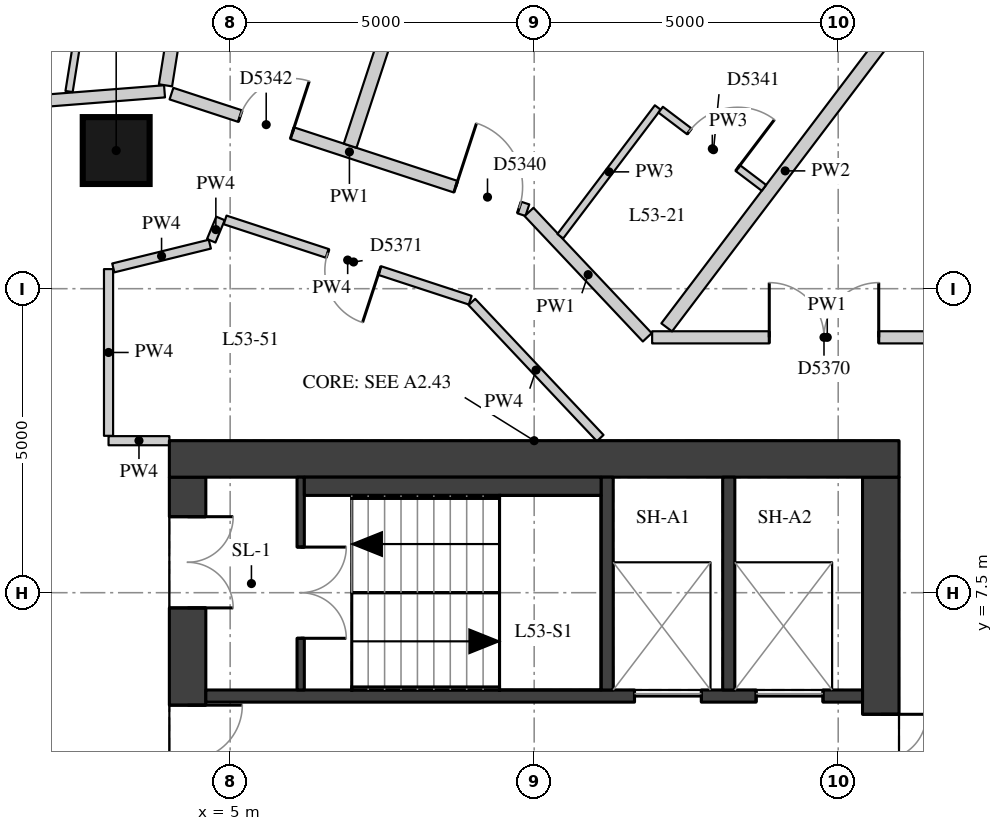
"""IFC4 building model, lengths in metres.
Left out: names, types, materials, properties, quantities, classifications, styles, units other than length and angle.
Written with IfcOpenShell. Run it as: python <this file> out.ifc"""

import sys

from ifc_helpers import new_model, si_unit, direction, frame, frame_2d, origin, origin_2d, place, context, subcontext, project, spatial, rectangle, extrude, element, fill, save


model = new_model("IFC4")
c1 = context("Model", 3, precision=1e-05, world=origin(), true_north=direction((0.0, 1.0)))
c2 = subcontext(c1, "Body", "Model", "MODEL_VIEW")
j1 = project(units=[si_unit("LENGTHUNIT", "METRE"), si_unit("PLANEANGLEUNIT", "RADIAN")], contexts=[c1])
p1 = place(None, origin())
s1 = spatial("IfcSite", under=j1, at=p1, CompositionType="ELEMENT")
p2 = place(p1, origin())
s2 = spatial("IfcBuilding", under=s1, at=p2, CompositionType="ELEMENT")
p3 = place(p2, frame((0.0, 0.0, 189.2)))
s3 = spatial("IfcBuildingStorey", under=s2, at=p3, CompositionType="ELEMENT", Elevation=189.2)
p4 = place(p3, frame((3.126, 14.772, 0.0), z_axis=(0.0, 0.0, 1.0), x_axis=(1.0, 0.0, 0.0)))
e1 = element("IfcColumn", 1, at=p4, inside=s3, PredefinedType="COLUMN", context=c2, shape_type="SweptSolid", body=[
    extrude(rectangle(XDim=1.1, YDim=1.1, at=origin_2d()), origin(), (0.0, 0.0, 1.0), 3.3),
])
p5 = place(p3, frame((4.3, -9.4, 0.0), z_axis=(0.0, 0.0, 1.0), x_axis=(0.0, 1.0, 0.0)))
e2 = element("IfcWall", 2, at=p5, inside=s3, PredefinedType="SHEAR", context=c2, shape_type="SweptSolid", body=[
    extrude(rectangle(XDim=18.8, YDim=0.6, at=frame_2d((9.4, 0.0))), origin(), (0.0, 0.0, 1.0), 3.02),
])
p6 = place(p5, frame((0.65, 0.0, 0.0)))
e3 = element("IfcOpeningElement", 3, at=p6, cuts=e2, PredefinedType="OPENING", context=c2, shape_type="SweptSolid", body=[
    extrude(rectangle(XDim=1.5, YDim=2.1, at=frame_2d((0.75, 1.05))), frame((0.0, 0.31, 0.0), z_axis=(0.0, -1.0, 0.0), x_axis=(1.0, 0.0, 0.0)), (0.0, 0.0, 1.0), 0.62),
])
p7 = place(p5, frame((3.75, 0.0, 0.0)))
e4 = element("IfcOpeningElement", 4, at=p7, cuts=e2, PredefinedType="OPENING", context=c2, shape_type="SweptSolid", body=[
    extrude(rectangle(XDim=1.8, YDim=2.1, at=frame_2d((0.9, 1.05))), frame((0.0, 0.31, 0.0), z_axis=(0.0, -1.0, 0.0), x_axis=(1.0, 0.0, 0.0)), (0.0, 0.0, 1.0), 0.62),
])
p8 = place(p5, frame((6.25, 0.0, 0.0)))
e5 = element("IfcOpeningElement", 5, at=p8, cuts=e2, PredefinedType="OPENING", context=c2, shape_type="SweptSolid", body=[
    extrude(rectangle(XDim=1.1, YDim=2.1, at=frame_2d((0.55, 1.05))), frame((0.0, 0.31, 0.0), z_axis=(0.0, -1.0, 0.0), x_axis=(1.0, 0.0, 0.0)), (0.0, 0.0, 1.0), 0.62),
])
p9 = place(p5, frame((8.9, 0.0, 0.0)))
e6 = element("IfcOpeningElement", 6, at=p9, cuts=e2, PredefinedType="OPENING", context=c2, shape_type="SweptSolid", body=[
    extrude(rectangle(XDim=1.0, YDim=2.1, at=frame_2d((0.5, 1.05))), frame((0.0, 0.31, 0.0), z_axis=(0.0, -1.0, 0.0), x_axis=(1.0, 0.0, 0.0)), (0.0, 0.0, 1.0), 0.62),
])
p10 = place(p5, frame((11.45, 0.0, 0.0)))
e7 = element("IfcOpeningElement", 7, at=p10, cuts=e2, PredefinedType="OPENING", context=c2, shape_type="SweptSolid", body=[
    extrude(rectangle(XDim=1.1, YDim=2.1, at=frame_2d((0.55, 1.05))), frame((0.0, 0.31, 0.0), z_axis=(0.0, -1.0, 0.0), x_axis=(1.0, 0.0, 0.0)), (0.0, 0.0, 1.0), 0.62),
])
p11 = place(p5, frame((13.25, 0.0, 0.0)))
e8 = element("IfcOpeningElement", 8, at=p11, cuts=e2, PredefinedType="OPENING", context=c2, shape_type="SweptSolid", body=[
    extrude(rectangle(XDim=1.8, YDim=2.1, at=frame_2d((0.9, 1.05))), frame((0.0, 0.31, 0.0), z_axis=(0.0, -1.0, 0.0), x_axis=(1.0, 0.0, 0.0)), (0.0, 0.0, 1.0), 0.62),
])
p12 = place(p5, frame((16.65, 0.0, 0.0)))
e9 = element("IfcOpeningElement", 9, at=p12, cuts=e2, PredefinedType="OPENING", context=c2, shape_type="SweptSolid", body=[
    extrude(rectangle(XDim=1.5, YDim=2.1, at=frame_2d((0.75, 1.05))), frame((0.0, 0.31, 0.0), z_axis=(0.0, -1.0, 0.0), x_axis=(1.0, 0.0, 0.0)), (0.0, 0.0, 1.0), 0.62),
])
p13 = place(p3, frame((15.7, -9.4, 0.0), z_axis=(0.0, 0.0, 1.0), x_axis=(0.0, 1.0, 0.0)))
e10 = element("IfcWall", 10, at=p13, inside=s3, PredefinedType="SHEAR", context=c2, shape_type="SweptSolid", body=[
    extrude(rectangle(XDim=18.8, YDim=0.6, at=frame_2d((9.4, 0.0))), origin(), (0.0, 0.0, 1.0), 3.02),
])
p14 = place(p13, frame((13.4, 0.0, 0.0)))
e11 = element("IfcOpeningElement", 11, at=p14, cuts=e10, PredefinedType="OPENING", context=c2, shape_type="SweptSolid", body=[
    extrude(rectangle(XDim=1.5, YDim=2.1, at=frame_2d((0.75, 1.05))), frame((0.0, 0.31, 0.0), z_axis=(0.0, -1.0, 0.0), x_axis=(1.0, 0.0, 0.0)), (0.0, 0.0, 1.0), 0.62),
])
p15 = place(p13, frame((3.9, 0.0, 0.0)))
e12 = element("IfcOpeningElement", 12, at=p15, cuts=e10, PredefinedType="OPENING", context=c2, shape_type="SweptSolid", body=[
    extrude(rectangle(XDim=1.5, YDim=2.1, at=frame_2d((0.75, 1.05))), frame((0.0, 0.31, 0.0), z_axis=(0.0, -1.0, 0.0), x_axis=(1.0, 0.0, 0.0)), (0.0, 0.0, 1.0), 0.62),
])
p16 = place(p3, frame((4.0, 9.7, 0.0), z_axis=(0.0, 0.0, 1.0), x_axis=(1.0, 0.0, 0.0)))
e13 = element("IfcWall", 13, at=p16, inside=s3, PredefinedType="SHEAR", context=c2, shape_type="SweptSolid", body=[
    extrude(rectangle(XDim=12.0, YDim=0.6, at=frame_2d((6.0, 0.0))), origin(), (0.0, 0.0, 1.0), 3.02),
])
p17 = place(p3, frame((4.6, 5.8, 0.0), z_axis=(0.0, 0.0, 1.0), x_axis=(1.0, 0.0, 0.0)))
e14 = element("IfcWall", 14, at=p17, inside=s3, PredefinedType="SHEAR", context=c2, shape_type="SweptSolid", body=[
    extrude(rectangle(XDim=10.8, YDim=0.2, at=frame_2d((5.4, 0.0))), origin(), (0.0, 0.0, 1.0), 3.02),
])
p18 = place(p17, frame((7.05, 0.0, 0.0)))
e15 = element("IfcOpeningElement", 15, at=p18, cuts=e14, PredefinedType="OPENING", context=c2, shape_type="SweptSolid", body=[
    extrude(rectangle(XDim=1.1, YDim=2.1, at=frame_2d((0.55, 1.05))), frame((0.0, 0.11, 0.0), z_axis=(0.0, -1.0, 0.0), x_axis=(1.0, 0.0, 0.0)), (0.0, 0.0, 1.0), 0.22),
])
p19 = place(p17, frame((9.05, 0.0, 0.0)))
e16 = element("IfcOpeningElement", 16, at=p19, cuts=e14, PredefinedType="OPENING", context=c2, shape_type="SweptSolid", body=[
    extrude(rectangle(XDim=1.1, YDim=2.1, at=frame_2d((0.55, 1.05))), frame((0.0, 0.11, 0.0), z_axis=(0.0, -1.0, 0.0), x_axis=(1.0, 0.0, 0.0)), (0.0, 0.0, 1.0), 0.22),
])
for number, where, z_axis, x_axis in (
    (17, (11.2, 5.9, 0.0), (0.0, 0.0, 1.0), (0.0, 1.0, 0.0)),
    (18, (13.2, 5.9, 0.0), (0.0, 0.0, 1.0), (0.0, 1.0, 0.0)),
):
    element("IfcWall", number, at=place(p3, frame(where, z_axis=z_axis, x_axis=x_axis)), inside=s3, PredefinedType="SHEAR", context=c2, shape_type="SweptSolid", body=[
        extrude(rectangle(XDim=3.5, YDim=0.2, at=frame_2d((1.75, 0.0))), origin(), (0.0, 0.0, 1.0), 3.02),
    ])
p20 = place(p3, frame((6.16, 5.9, 0.0), z_axis=(0.0, 0.0, 1.0), x_axis=(0.0, 1.0, 0.0)))
e19 = element("IfcWall", 19, at=p20, inside=s3, PredefinedType="SHEAR", context=c2, shape_type="SweptSolid", body=[
    extrude(rectangle(XDim=3.5, YDim=0.12, at=frame_2d((1.75, 0.0))), origin(), (0.0, 0.0, 1.0), 3.02),
])
p21 = place(p20, frame((0.85, 0.0, 0.0)))
e20 = element("IfcOpeningElement", 20, at=p21, cuts=e19, PredefinedType="OPENING", context=c2, shape_type="SweptSolid", body=[
    extrude(rectangle(XDim=1.5, YDim=2.1, at=frame_2d((0.75, 1.05))), frame((0.0, 0.07, 0.0), z_axis=(0.0, -1.0, 0.0), x_axis=(1.0, 0.0, 0.0)), (0.0, 0.0, 1.0), 0.14),
])
p22 = place(p3, frame((6.22, 9.25, 0.0), z_axis=(0.0, 0.0, 1.0), x_axis=(1.0, 0.0, 0.0)))
e21 = element("IfcWall", 21, at=p22, inside=s3, PredefinedType="PARTITIONING", context=c2, shape_type="SweptSolid", body=[
    extrude(rectangle(XDim=4.88, YDim=0.3, at=frame_2d((2.44, 0.0))), origin(), (0.0, 0.0, 1.0), 3.02),
])
p23 = place(p3, frame((-6.656, 14.915, 0.0), z_axis=(0.0, 0.0, 1.0), x_axis=(0.99693112817, 0.07828362335, 0.0)))
e22 = element("IfcWall", 22, at=p23, inside=s3, PredefinedType="PARTITIONING", context=c2, shape_type="SweptSolid", body=[
    extrude(rectangle(XDim=10.61, YDim=0.2, at=frame_2d((5.305, 0.0))), origin(), (0.0, 0.0, 1.0), 2.42),
])
p24 = place(p23, frame((7.773, 0.0, 0.0)))
e23 = element("IfcOpeningElement", 23, at=p24, cuts=e22, PredefinedType="OPENING", context=c2, shape_type="SweptSolid", body=[
    extrude(rectangle(XDim=0.9, YDim=2.1, at=frame_2d((0.45, 1.05))), frame((0.0, 0.11, 0.0), z_axis=(0.0, -1.0, 0.0), x_axis=(1.0, 0.0, 0.0)), (0.0, 0.0, 1.0), 0.22),
])
p25 = place(p23, frame((4.608, 0.0, 0.0)))
e24 = element("IfcOpeningElement", 24, at=p25, cuts=e22, PredefinedType="OPENING", context=c2, shape_type="SweptSolid", body=[
    extrude(rectangle(XDim=0.9, YDim=2.1, at=frame_2d((0.45, 1.05))), frame((0.0, 0.11, 0.0), z_axis=(0.0, -1.0, 0.0), x_axis=(1.0, 0.0, 0.0)), (0.0, 0.0, 1.0), 0.22),
])
p26 = place(p23, frame((1.632, 0.0, 0.0)))
e25 = element("IfcOpeningElement", 25, at=p26, cuts=e22, PredefinedType="OPENING", context=c2, shape_type="SweptSolid", body=[
    extrude(rectangle(XDim=0.9, YDim=2.1, at=frame_2d((0.45, 1.05))), frame((0.0, 0.11, 0.0), z_axis=(0.0, -1.0, 0.0), x_axis=(1.0, 0.0, 0.0)), (0.0, 0.0, 1.0), 0.22),
])
p27 = place(p3, frame((4.035, 15.708, 0.0), z_axis=(0.0, 0.0, 1.0), x_axis=(0.950331063317, -0.31124085544, 0.0)))
e26 = element("IfcWall", 26, at=p27, inside=s3, PredefinedType="PARTITIONING", context=c2, shape_type="SweptSolid", body=[
    extrude(rectangle(XDim=6.159, YDim=0.2, at=frame_2d((3.08, 0.0))), origin(), (0.0, 0.0, 1.0), 3.02),
])
p28 = place(p27, frame((4.919, 0.0, 0.0)))
e27 = element("IfcOpeningElement", 27, at=p28, cuts=e26, PredefinedType="OPENING", context=c2, shape_type="SweptSolid", body=[
    extrude(rectangle(XDim=1.1, YDim=2.1, at=frame_2d((0.55, 1.05))), frame((0.0, 0.11, 0.0), z_axis=(0.0, -1.0, 0.0), x_axis=(1.0, 0.0, 0.0)), (0.0, 0.0, 1.0), 0.22),
])
p29 = place(p27, frame((1.189, 0.0, 0.0)))
e28 = element("IfcOpeningElement", 28, at=p29, cuts=e26, PredefinedType="OPENING", context=c2, shape_type="SweptSolid", body=[
    extrude(rectangle(XDim=0.9, YDim=2.1, at=frame_2d((0.45, 1.05))), frame((0.0, 0.11, 0.0), z_axis=(0.0, -1.0, 0.0), x_axis=(1.0, 0.0, 0.0)), (0.0, 0.0, 1.0), 0.22),
])
p30 = place(p3, frame((9.916, 13.762, 0.0), z_axis=(0.0, 0.0, 1.0), x_axis=(0.686041532799, -0.727562378958, 0.0)))
e29 = element("IfcWall", 29, at=p30, inside=s3, PredefinedType="PARTITIONING", context=c2, shape_type="SweptSolid", body=[
    extrude(rectangle(XDim=2.834, YDim=0.2, at=frame_2d((1.417, 0.0))), origin(), (0.0, 0.0, 1.0), 3.02),
])
p31 = place(p3, frame((11.94, 11.7, 0.0), z_axis=(0.0, 0.0, 1.0), x_axis=(1.0, 0.0, 0.0)))
e30 = element("IfcWall", 30, at=p31, inside=s3, PredefinedType="PARTITIONING", context=c2, shape_type="SweptSolid", body=[
    extrude(rectangle(XDim=5.76, YDim=0.2, at=frame_2d((2.88, 0.0))), origin(), (0.0, 0.0, 1.0), 3.02),
])
p32 = place(p31, frame((1.927, 0.0, 0.0)))
e31 = element("IfcOpeningElement", 31, at=p32, cuts=e30, PredefinedType="OPENING", context=c2, shape_type="SweptSolid", body=[
    extrude(rectangle(XDim=1.8, YDim=2.1, at=frame_2d((0.9, 1.05))), frame((0.0, 0.11, 0.0), z_axis=(0.0, -1.0, 0.0), x_axis=(1.0, 0.0, 0.0)), (0.0, 0.0, 1.0), 0.22),
])
p33 = place(p3, frame((4.001, 10.0, 0.0), z_axis=(0.0, 0.0, 1.0), x_axis=(-1.0, 0.0, 0.0)))
e32 = element("IfcWall", 32, at=p33, inside=s3, PredefinedType="PARTITIONING", context=c2, shape_type="SweptSolid", body=[
    extrude(rectangle(XDim=1.001, YDim=0.15, at=frame_2d((0.5, 0.0))), origin(), (0.0, 0.0, 1.0), 3.02),
])
p34 = place(p3, frame((3.0, 10.08, 0.0), z_axis=(0.0, 0.0, 1.0), x_axis=(0.0, 1.0, 0.0)))
e33 = element("IfcWall", 33, at=p34, inside=s3, PredefinedType="PARTITIONING", context=c2, shape_type="SweptSolid", body=[
    extrude(rectangle(XDim=2.742, YDim=0.15, at=frame_2d((1.371, 0.0))), origin(), (0.0, 0.0, 1.0), 3.02),
])
p35 = place(p3, frame((3.078, 12.842, 0.0), z_axis=(0.0, 0.0, 1.0), x_axis=(0.9710404657, 0.238915076906, 0.0)))
e34 = element("IfcWall", 34, at=p35, inside=s3, PredefinedType="PARTITIONING", context=c2, shape_type="SweptSolid", body=[
    extrude(rectangle(XDim=1.635, YDim=0.15, at=frame_2d((0.817, 0.0))), origin(), (0.0, 0.0, 1.0), 3.02),
])
p36 = place(p3, frame((4.688, 13.288, 0.0), z_axis=(0.0, 0.0, 1.0), x_axis=(0.38330857492, 0.923620342128, 0.0)))
e35 = element("IfcWall", 35, at=p36, inside=s3, PredefinedType="PARTITIONING", context=c2, shape_type="SweptSolid", body=[
    extrude(rectangle(XDim=0.398, YDim=0.15, at=frame_2d((0.199, 0.0))), origin(), (0.0, 0.0, 1.0), 3.02),
])
p37 = place(p3, frame((4.917, 13.631, 0.0), z_axis=(0.0, 0.0, 1.0), x_axis=(0.950299632499, -0.311336808733, 0.0)))
e36 = element("IfcWall", 36, at=p37, inside=s3, PredefinedType="PARTITIONING", context=c2, shape_type="SweptSolid", body=[
    extrude(rectangle(XDim=4.241, YDim=0.15, at=frame_2d((2.121, 0.0))), origin(), (0.0, 0.0, 1.0), 3.02),
])
p38 = place(p37, frame((1.773, 0.0, 0.0)))
e37 = element("IfcOpeningElement", 37, at=p38, cuts=e36, PredefinedType="OPENING", context=c2, shape_type="SweptSolid", body=[
    extrude(rectangle(XDim=0.9, YDim=2.1, at=frame_2d((0.45, 1.05))), frame((0.0, 0.085, 0.0), z_axis=(0.0, -1.0, 0.0), x_axis=(1.0, 0.0, 0.0)), (0.0, 0.0, 1.0), 0.17),
])
p39 = place(p3, frame((8.975, 12.281, 0.0), z_axis=(0.0, 0.0, 1.0), x_axis=(0.686010468192, -0.727591669503, 0.0)))
e38 = element("IfcWall", 38, at=p39, inside=s3, PredefinedType="PARTITIONING", context=c2, shape_type="SweptSolid", body=[
    extrude(rectangle(XDim=3.077, YDim=0.15, at=frame_2d((1.538, 0.0))), origin(), (0.0, 0.0, 1.0), 3.02),
])
p40 = place(p3, frame((16.077, 17.011, 0.0), z_axis=(0.0, 0.0, 1.0), x_axis=(-0.603635635975, -0.797260320712, 0.0)))
e39 = element("IfcWall", 39, at=p40, inside=s3, PredefinedType="PARTITIONING", context=c2, shape_type="SweptSolid", body=[
    extrude(rectangle(XDim=6.457, YDim=0.22, at=frame_2d((3.229, 0.0))), origin(), (0.0, 0.0, 1.0), 3.02),
])
p41 = place(p3, frame((8.908, 20.743, 0.0), z_axis=(0.0, 0.0, 1.0), x_axis=(-0.311984764468, -0.950087104817, 0.0)))
e40 = element("IfcWall", 40, at=p41, inside=s3, PredefinedType="PARTITIONING", context=c2, shape_type="SweptSolid", body=[
    extrude(rectangle(XDim=6.202, YDim=0.22, at=frame_2d((3.101, 0.0))), origin(), (0.0, 0.0, 1.0), 3.02),
])
p42 = place(p3, frame((4.871, 21.719, 0.0), z_axis=(0.0, 0.0, 1.0), x_axis=(-0.157106861106, -0.987581608878, 0.0)))
e41 = element("IfcWall", 41, at=p42, inside=s3, PredefinedType="PARTITIONING", context=c2, shape_type="SweptSolid", body=[
    extrude(rectangle(XDim=5.949, YDim=0.22, at=frame_2d((2.974, 0.0))), origin(), (0.0, 0.0, 1.0), 2.47),
])
p43 = place(p3, frame((10.43, 13.363, 0.0), z_axis=(0.0, 0.0, 1.0), x_axis=(0.603597479969, 0.797289208616, 0.0)))
e42 = element("IfcWall", 42, at=p43, inside=s3, PredefinedType="PARTITIONING", context=c2, shape_type="SweptSolid", body=[
    extrude(rectangle(XDim=2.656, YDim=0.12, at=frame_2d((1.328, 0.0))), origin(), (0.0, 0.0, 1.0), 3.02),
])
p44 = place(p3, frame((2.351, 15.742, 0.0), z_axis=(0.0, 0.0, 1.0), x_axis=(0.15712488734, 0.987578741052, 0.0)))
e43 = element("IfcWall", 43, at=p44, inside=s3, PredefinedType="PARTITIONING", context=c2, shape_type="SweptSolid", body=[
    extrude(rectangle(XDim=2.75, YDim=0.12, at=frame_2d((1.375, 0.0))), origin(), (0.0, 0.0, 1.0), 2.47),
])
p45 = place(p3, frame((12.081, 15.444, 0.0), z_axis=(0.0, 0.0, 1.0), x_axis=(0.797240905551, -0.603661277967, 0.0)))
e44 = element("IfcWall", 44, at=p45, inside=s3, PredefinedType="PARTITIONING", context=c2, shape_type="SweptSolid", body=[
    extrude(rectangle(XDim=2.13, YDim=0.12, at=frame_2d((1.065, 0.0))), origin(), (0.0, 0.0, 1.0), 3.02),
])
p46 = place(p45, frame((0.59, 0.0, 0.0)))
e45 = element("IfcOpeningElement", 45, at=p46, cuts=e44, PredefinedType="OPENING", context=c2, shape_type="SweptSolid", body=[
    extrude(rectangle(XDim=1.0, YDim=2.1, at=frame_2d((0.5, 1.05))), frame((0.0, 0.07, 0.0), z_axis=(0.0, -1.0, 0.0), x_axis=(1.0, 0.0, 0.0)), (0.0, 0.0, 1.0), 0.14),
])
p47 = place(p11, origin())
e46 = element("IfcDoor", 46, at=p47, inside=s3, OperationType="DOUBLE_DOOR_SINGLE_SWING", PredefinedType="DOOR", context=c2, shape_type="SweptSolid", body=[
    extrude(rectangle(XDim=1.8, YDim=2.1, at=frame_2d((0.9, 1.05))), frame((0.0, 0.025, 0.0), z_axis=(0.0, -1.0, 0.0), x_axis=(1.0, 0.0, 0.0)), (0.0, 0.0, 1.0), 0.05),
])
fill(e8, e46)
p48 = place(p12, origin())
e47 = element("IfcDoor", 47, at=p48, inside=s3, OperationType="DOUBLE_DOOR_SINGLE_SWING", PredefinedType="DOOR", context=c2, shape_type="SweptSolid", body=[
    extrude(rectangle(XDim=1.5, YDim=2.1, at=frame_2d((0.75, 1.05))), frame((0.0, 0.025, 0.0), z_axis=(0.0, -1.0, 0.0), x_axis=(1.0, 0.0, 0.0)), (0.0, 0.0, 1.0), 0.05),
])
fill(e9, e47)
p49 = place(p14, origin())
e48 = element("IfcDoor", 48, at=p49, inside=s3, OperationType="DOUBLE_DOOR_SINGLE_SWING", PredefinedType="DOOR", context=c2, shape_type="SweptSolid", body=[
    extrude(rectangle(XDim=1.5, YDim=2.1, at=frame_2d((0.75, 1.05))), frame((0.0, 0.025, 0.0), z_axis=(0.0, -1.0, 0.0), x_axis=(1.0, 0.0, 0.0)), (0.0, 0.0, 1.0), 0.05),
])
fill(e11, e48)
p50 = place(p21, origin())
e49 = element("IfcDoor", 49, at=p50, inside=s3, OperationType="DOUBLE_DOOR_SINGLE_SWING", PredefinedType="DOOR", context=c2, shape_type="SweptSolid", body=[
    extrude(rectangle(XDim=1.5, YDim=2.1, at=frame_2d((0.75, 1.05))), frame((0.0, 0.025, 0.0), z_axis=(0.0, -1.0, 0.0), x_axis=(1.0, 0.0, 0.0)), (0.0, 0.0, 1.0), 0.05),
])
fill(e20, e49)
p51 = place(p18, origin())
e50 = element("IfcDoor", 50, at=p51, inside=s3, OperationType="DOUBLE_DOOR_SLIDING", PredefinedType="DOOR", context=c2, shape_type="SweptSolid", body=[
    extrude(rectangle(XDim=1.1, YDim=2.1, at=frame_2d((0.55, 1.05))), frame((0.0, 0.025, 0.0), z_axis=(0.0, -1.0, 0.0), x_axis=(1.0, 0.0, 0.0)), (0.0, 0.0, 1.0), 0.05),
])
fill(e15, e50)
p52 = place(p19, origin())
e51 = element("IfcDoor", 51, at=p52, inside=s3, OperationType="DOUBLE_DOOR_SLIDING", PredefinedType="DOOR", context=c2, shape_type="SweptSolid", body=[
    extrude(rectangle(XDim=1.1, YDim=2.1, at=frame_2d((0.55, 1.05))), frame((0.0, 0.025, 0.0), z_axis=(0.0, -1.0, 0.0), x_axis=(1.0, 0.0, 0.0)), (0.0, 0.0, 1.0), 0.05),
])
fill(e16, e51)
p53 = place(p28, origin())
e52 = element("IfcDoor", 52, at=p53, inside=s3, OperationType="SINGLE_SWING_LEFT", PredefinedType="DOOR", context=c2, shape_type="SweptSolid", body=[
    extrude(rectangle(XDim=1.1, YDim=2.1, at=frame_2d((0.55, 1.05))), frame((0.0, 0.025, 0.0), z_axis=(0.0, -1.0, 0.0), x_axis=(1.0, 0.0, 0.0)), (0.0, 0.0, 1.0), 0.05),
])
fill(e27, e52)
p54 = place(p46, origin())
e53 = element("IfcDoor", 53, at=p54, inside=s3, OperationType="SINGLE_SWING_RIGHT", PredefinedType="DOOR", context=c2, shape_type="SweptSolid", body=[
    extrude(rectangle(XDim=1.0, YDim=2.1, at=frame_2d((0.5, 1.05))), frame((0.0, 0.025, 0.0), z_axis=(0.0, -1.0, 0.0), x_axis=(1.0, 0.0, 0.0)), (0.0, 0.0, 1.0), 0.05),
])
fill(e45, e53)
p55 = place(p29, origin())
e54 = element("IfcDoor", 54, at=p55, inside=s3, OperationType="SINGLE_SWING_RIGHT", PredefinedType="DOOR", context=c2, shape_type="SweptSolid", body=[
    extrude(rectangle(XDim=0.9, YDim=2.1, at=frame_2d((0.45, 1.05))), frame((0.0, 0.025, 0.0), z_axis=(0.0, -1.0, 0.0), x_axis=(1.0, 0.0, 0.0)), (0.0, 0.0, 1.0), 0.05),
])
fill(e28, e54)
p56 = place(p32, origin())
e55 = element("IfcDoor", 55, at=p56, inside=s3, OperationType="DOUBLE_DOOR_SINGLE_SWING", PredefinedType="DOOR", context=c2, shape_type="SweptSolid", body=[
    extrude(rectangle(XDim=1.8, YDim=2.1, at=frame_2d((0.9, 1.05))), frame((0.0, 0.025, 0.0), z_axis=(0.0, -1.0, 0.0), x_axis=(1.0, 0.0, 0.0)), (0.0, 0.0, 1.0), 0.05),
])
fill(e31, e55)
p57 = place(p38, origin())
e56 = element("IfcDoor", 56, at=p57, inside=s3, OperationType="SINGLE_SWING_LEFT", PredefinedType="DOOR", context=c2, shape_type="SweptSolid", body=[
    extrude(rectangle(XDim=0.9, YDim=2.1, at=frame_2d((0.45, 1.05))), frame((0.0, 0.025, 0.0), z_axis=(0.0, -1.0, 0.0), x_axis=(1.0, 0.0, 0.0)), (0.0, 0.0, 1.0), 0.05),
])
fill(e37, e56)
save(model, sys.argv[1])
